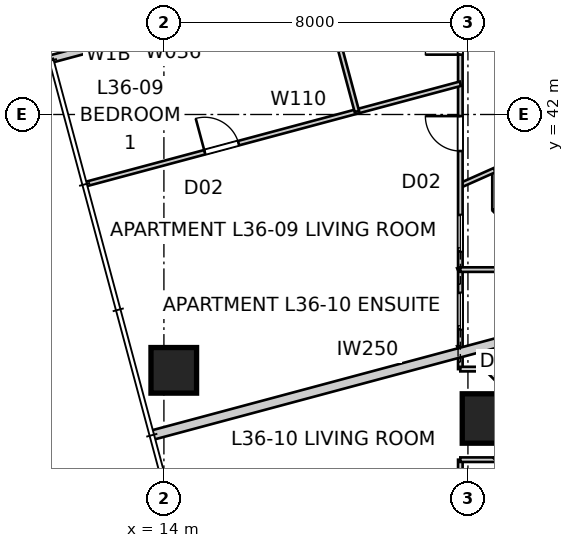
"""IFC4 building model, lengths in metres.
Left out: names, types, materials, properties, quantities, classifications, styles, units other than length and angle.
Written with IfcOpenShell. Run it as: python <this file> out.ifc"""

import sys

from ifc_helpers import new_model, si_unit, direction, frame, frame_2d, origin, origin_2d, place, context, subcontext, project, spatial, rectangle, extrude, element, fill, save


model = new_model("IFC4")
c1 = context("Model", 3, precision=1e-05, world=origin(), true_north=direction((0.0, 1.0)))
c2 = subcontext(c1, "Body", "Model", "MODEL_VIEW")
j1 = project(units=[si_unit("LENGTHUNIT", "METRE"), si_unit("PLANEANGLEUNIT", "RADIAN")], contexts=[c1])
p1 = place(None, origin())
s1 = spatial("IfcSite", under=j1, at=p1, CompositionType="ELEMENT")
p2 = place(p1, origin())
s2 = spatial("IfcBuilding", under=s1, at=p2, CompositionType="ELEMENT")
p3 = place(p2, frame((0.0, 0.0, 132.0)))
s3 = spatial("IfcBuildingStorey", under=s2, at=p3, CompositionType="ELEMENT", Elevation=132.0)
p4 = place(p3, frame((14.26, 35.267, 0.0), z_axis=(0.0, 0.0, 1.0), x_axis=(1.0, 0.0, 0.0)))
e1 = element("IfcColumn", 1, at=p4, inside=s3, PredefinedType="COLUMN", context=c2, shape_type="SweptSolid", body=[
    extrude(rectangle(XDim=1.2, YDim=1.2, at=origin_2d()), origin(), (0.0, 0.0, 1.0), 3.4),
])
p5 = place(p3, frame((22.5, 34.0, 0.0), z_axis=(0.0, 0.0, 1.0), x_axis=(1.0, 0.0, 0.0)))
e2 = element("IfcColumn", 2, at=p5, inside=s3, PredefinedType="COLUMN", context=c2, shape_type="SweptSolid", body=[
    extrude(rectangle(XDim=1.3, YDim=1.3, at=origin_2d()), origin(), (0.0, 0.0, 1.0), 3.4),
])
p6 = place(p3, frame((14.893, 44.496, 0.0), z_axis=(0.0, 0.0, 1.0), x_axis=(-0.965934430412, -0.258786931944, 0.0)))
e3 = element("IfcWall", 3, at=p6, inside=s3, PredefinedType="SOLIDWALL", context=c2, shape_type="SweptSolid", body=[
    extrude(rectangle(XDim=4.0, YDim=0.2, at=frame_2d((2.0, 0.0))), origin(), (0.0, 0.0, 1.0), 3.25),
])
p7 = place(p6, frame((1.0, 0.0, 0.45)))
e4 = element("IfcOpeningElement", 4, at=p7, cuts=e3, PredefinedType="OPENING", context=c2, shape_type="SweptSolid", body=[
    extrude(rectangle(XDim=2.0, YDim=1.8, at=frame_2d((1.0, 0.9))), frame((0.0, 0.11, 0.0), z_axis=(0.0, -1.0, 0.0), x_axis=(1.0, 0.0, 0.0)), (0.0, 0.0, 1.0), 0.22),
])
p8 = place(p3, frame((13.682, 33.56, 0.0), z_axis=(0.0, 0.0, 1.0), x_axis=(0.965924438766, 0.258824223352, 0.0)))
e5 = element("IfcWall", 5, at=p8, inside=s3, PredefinedType="PARTITIONING", context=c2, shape_type="SweptSolid", body=[
    extrude(rectangle(XDim=12.138, YDim=0.25, at=frame_2d((6.069, 0.0))), origin(), (0.0, 0.0, 1.0), 3.25),
])
p9 = place(p3, frame((21.8, 11.8, 0.0), z_axis=(0.0, 0.0, 1.0), x_axis=(0.0, 1.0, 0.0)))
e6 = element("IfcWall", 6, at=p9, inside=s3, PredefinedType="PARTITIONING", context=c2, shape_type="SweptSolid", body=[
    extrude(rectangle(XDim=21.116, YDim=0.12, at=frame_2d((10.558, 0.0))), origin(), (0.0, 0.0, 1.0), 3.25),
])
p10 = place(p9, frame((4.046, 0.0, 0.0)))
e7 = element("IfcOpeningElement", 7, at=p10, cuts=e6, PredefinedType="OPENING", context=c2, shape_type="SweptSolid", body=[
    extrude(rectangle(XDim=0.92, YDim=2.34, at=frame_2d((0.46, 1.17))), frame((0.0, 0.07, 0.0), z_axis=(0.0, -1.0, 0.0), x_axis=(1.0, 0.0, 0.0)), (0.0, 0.0, 1.0), 0.14),
])
p11 = place(p9, frame((7.358, 0.0, 0.0)))
e8 = element("IfcOpeningElement", 8, at=p11, cuts=e6, PredefinedType="OPENING", context=c2, shape_type="SweptSolid", body=[
    extrude(rectangle(XDim=0.92, YDim=2.34, at=frame_2d((0.46, 1.17))), frame((0.0, 0.07, 0.0), z_axis=(0.0, -1.0, 0.0), x_axis=(1.0, 0.0, 0.0)), (0.0, 0.0, 1.0), 0.14),
])
p12 = place(p9, frame((14.958, 0.0, 0.0)))
e9 = element("IfcOpeningElement", 9, at=p12, cuts=e6, PredefinedType="OPENING", context=c2, shape_type="SweptSolid", body=[
    extrude(rectangle(XDim=0.92, YDim=2.34, at=frame_2d((0.46, 1.17))), frame((0.0, 0.07, 0.0), z_axis=(0.0, -1.0, 0.0), x_axis=(1.0, 0.0, 0.0)), (0.0, 0.0, 1.0), 0.14),
])
p13 = place(p9, frame((17.31, 0.0, 0.0)))
e10 = element("IfcOpeningElement", 10, at=p13, cuts=e6, PredefinedType="OPENING", context=c2, shape_type="SweptSolid", body=[
    extrude(rectangle(XDim=0.92, YDim=2.34, at=frame_2d((0.46, 1.17))), frame((0.0, 0.07, 0.0), z_axis=(0.0, -1.0, 0.0), x_axis=(1.0, 0.0, 0.0)), (0.0, 0.0, 1.0), 0.14),
])
p14 = place(p3, frame((23.3, 38.9, 0.0), z_axis=(0.0, 0.0, 1.0), x_axis=(-0.707106781187, 0.707106781187, 0.0)))
e11 = element("IfcWall", 11, at=p14, inside=s3, PredefinedType="PARTITIONING", context=c2, shape_type="SweptSolid", body=[
    extrude(rectangle(XDim=0.849, YDim=0.12, at=frame_2d((0.424, 0.0))), origin(), (0.0, 0.0, 1.0), 3.25),
])
p15 = place(p3, frame((22.7, 39.5, 0.0), z_axis=(0.0, 0.0, 1.0), x_axis=(0.0, 1.0, 0.0)))
e12 = element("IfcWall", 12, at=p15, inside=s3, PredefinedType="PARTITIONING", context=c2, shape_type="SweptSolid", body=[
    extrude(rectangle(XDim=1.035, YDim=0.12, at=frame_2d((0.518, 0.0))), origin(), (0.0, 0.0, 1.0), 3.25),
])
p16 = place(p3, frame((22.7, 40.535, 0.0), z_axis=(0.0, 0.0, 1.0), x_axis=(-0.913739977195, -0.406299463544, 0.0)))
e13 = element("IfcWall", 13, at=p16, inside=s3, PredefinedType="PARTITIONING", context=c2, shape_type="SweptSolid", body=[
    extrude(rectangle(XDim=0.985, YDim=0.12, at=frame_2d((0.492, 0.0))), origin(), (0.0, 0.0, 1.0), 3.25),
])
p17 = place(p3, frame((21.8, 35.3, 0.0), z_axis=(0.0, 0.0, 1.0), x_axis=(0.0, 1.0, 0.0)))
e14 = element("IfcWall", 14, at=p17, inside=s3, PredefinedType="PARTITIONING", context=c2, shape_type="SweptSolid", body=[
    extrude(rectangle(XDim=12.45, YDim=0.12, at=frame_2d((6.225, 0.0))), origin(), (0.0, 0.0, 1.0), 2.637),
])
p18 = place(p17, frame((5.738, 0.0, 0.0)))
e15 = element("IfcOpeningElement", 15, at=p18, cuts=e14, PredefinedType="OPENING", context=c2, shape_type="SweptSolid", body=[
    extrude(rectangle(XDim=0.92, YDim=2.34, at=frame_2d((0.46, 1.17))), frame((0.0, 0.07, 0.0), z_axis=(0.0, -1.0, 0.0), x_axis=(1.0, 0.0, 0.0)), (0.0, 0.0, 1.0), 0.14),
])
p19 = place(p17, frame((8.275, 0.0, 0.0)))
e16 = element("IfcOpeningElement", 16, at=p19, cuts=e14, PredefinedType="OPENING", context=c2, shape_type="SweptSolid", body=[
    extrude(rectangle(XDim=0.92, YDim=2.34, at=frame_2d((0.46, 1.17))), frame((0.0, 0.07, 0.0), z_axis=(0.0, -1.0, 0.0), x_axis=(1.0, 0.0, 0.0)), (0.0, 0.0, 1.0), 0.14),
])
p20 = place(p17, frame((3.097, 0.0, 0.0)))
e17 = element("IfcOpeningElement", 17, at=p20, cuts=e14, PredefinedType="OPENING", context=c2, shape_type="SweptSolid", body=[
    extrude(rectangle(XDim=0.96, YDim=2.1, at=frame_2d((0.48, 1.05))), frame((0.0, 0.07, 0.0), z_axis=(0.0, -1.0, 0.0), x_axis=(1.0, 0.0, 0.0)), (0.0, 0.0, 1.0), 0.14),
])
p21 = place(p17, frame((1.047, 0.0, 0.0)))
e18 = element("IfcOpeningElement", 18, at=p21, cuts=e14, PredefinedType="OPENING", context=c2, shape_type="SweptSolid", body=[
    extrude(rectangle(XDim=0.96, YDim=2.1, at=frame_2d((0.48, 1.05))), frame((0.0, 0.07, 0.0), z_axis=(0.0, -1.0, 0.0), x_axis=(1.0, 0.0, 0.0)), (0.0, 0.0, 1.0), 0.14),
])
p22 = place(p3, frame((25.4, 37.918, 0.0), z_axis=(0.0, 0.0, 1.0), x_axis=(-1.0, 0.0, 0.0)))
e19 = element("IfcWall", 19, at=p22, inside=s3, PredefinedType="PARTITIONING", context=c2, shape_type="SweptSolid", body=[
    extrude(rectangle(XDim=3.6, YDim=0.12, at=frame_2d((1.8, 0.0))), origin(), (0.0, 0.0, 1.0), 3.25),
])
p23 = place(p3, frame((11.952, 40.17, 0.0), z_axis=(0.0, 0.0, 1.0), x_axis=(0.965923039694, 0.258829444594, 0.0)))
e20 = element("IfcWall", 20, at=p23, inside=s3, PredefinedType="PARTITIONING", context=c2, shape_type="SweptSolid", body=[
    extrude(rectangle(XDim=10.196, YDim=0.12, at=frame_2d((5.098, 0.0))), origin(), (0.0, 0.0, 1.0), 3.25),
])
p24 = place(p23, frame((3.233, 0.0, 0.0)))
e21 = element("IfcOpeningElement", 21, at=p24, cuts=e20, PredefinedType="OPENING", context=c2, shape_type="SweptSolid", body=[
    extrude(rectangle(XDim=0.92, YDim=2.34, at=frame_2d((0.46, 1.17))), frame((0.0, 0.07, 0.0), z_axis=(0.0, -1.0, 0.0), x_axis=(1.0, 0.0, 0.0)), (0.0, 0.0, 1.0), 0.14),
])
p25 = place(p3, frame((17.168, 49.205, 0.0), z_axis=(0.0, 0.0, 1.0), x_axis=(0.258846923464, -0.965918355874, 0.0)))
e22 = element("IfcWall", 22, at=p25, inside=s3, PredefinedType="PARTITIONING", context=c2, shape_type="SweptSolid", body=[
    extrude(rectangle(XDim=7.377, YDim=0.12, at=frame_2d((3.688, 0.0))), origin(), (0.0, 0.0, 1.0), 3.25),
])
p26 = place(p25, frame((1.525, 0.0, 0.0)))
e23 = element("IfcOpeningElement", 23, at=p26, cuts=e22, PredefinedType="OPENING", context=c2, shape_type="SweptSolid", body=[
    extrude(rectangle(XDim=0.92, YDim=2.34, at=frame_2d((0.46, 1.17))), frame((0.0, 0.07, 0.0), z_axis=(0.0, -1.0, 0.0), x_axis=(1.0, 0.0, 0.0)), (0.0, 0.0, 1.0), 0.14),
])
p27 = place(p3, frame((25.4, 32.916, 0.0), z_axis=(0.0, 0.0, 1.0), x_axis=(-1.0, 0.0, 0.0)))
e24 = element("IfcWall", 24, at=p27, inside=s3, PredefinedType="PARTITIONING", context=c2, shape_type="SweptSolid", body=[
    extrude(rectangle(XDim=3.6, YDim=0.12, at=frame_2d((1.8, 0.0))), origin(), (0.0, 0.0, 1.0), 2.796),
])
p28 = place(p27, frame((0.862, 0.0, 0.0)))
e25 = element("IfcOpeningElement", 25, at=p28, cuts=e24, PredefinedType="OPENING", context=c2, shape_type="SweptSolid", body=[
    extrude(rectangle(XDim=0.96, YDim=2.1, at=frame_2d((0.48, 1.05))), frame((0.0, 0.07, 0.0), z_axis=(0.0, -1.0, 0.0), x_axis=(1.0, 0.0, 0.0)), (0.0, 0.0, 1.0), 0.14),
])
p29 = place(p3, frame((22.716, 32.916, 0.0), z_axis=(0.0, 0.0, 1.0), x_axis=(0.707106781187, 0.707106781187, 0.0)))
e26 = element("IfcWall", 26, at=p29, inside=s3, PredefinedType="PARTITIONING", context=c2, shape_type="SweptSolid", body=[
    extrude(rectangle(XDim=0.543, YDim=0.12, at=frame_2d((0.271, 0.0))), origin(), (0.0, 0.0, 1.0), 3.25),
])
p30 = place(p3, frame((23.1, 34.7, 0.0), z_axis=(0.0, 0.0, 1.0), x_axis=(-0.707106781187, 0.707106781187, 0.0)))
e27 = element("IfcWall", 27, at=p30, inside=s3, PredefinedType="PARTITIONING", context=c2, shape_type="SweptSolid", body=[
    extrude(rectangle(XDim=0.849, YDim=0.12, at=frame_2d((0.424, 0.0))), origin(), (0.0, 0.0, 1.0), 3.25),
])
p31 = place(p3, frame((22.5, 35.3, 0.0), z_axis=(0.0, 0.0, 1.0), x_axis=(-1.0, 0.0, 0.0)))
e28 = element("IfcWall", 28, at=p31, inside=s3, PredefinedType="PARTITIONING", context=c2, shape_type="SweptSolid", body=[
    extrude(rectangle(XDim=0.7, YDim=0.12, at=frame_2d((0.35, 0.0))), origin(), (0.0, 0.0, 1.0), 2.721),
])
p32 = place(p18, origin())
e29 = element("IfcDoor", 29, at=p32, inside=s3, OperationType="SINGLE_SWING_RIGHT", PredefinedType="DOOR", context=c2, shape_type="SweptSolid", body=[
    extrude(rectangle(XDim=0.92, YDim=2.34, at=frame_2d((0.46, 1.17))), frame((0.0, 0.025, 0.0), z_axis=(0.0, -1.0, 0.0), x_axis=(1.0, 0.0, 0.0)), (0.0, 0.0, 1.0), 0.05),
])
fill(e15, e29)
p33 = place(p19, origin())
e30 = element("IfcDoor", 30, at=p33, inside=s3, OperationType="SINGLE_SWING_LEFT", PredefinedType="DOOR", context=c2, shape_type="SweptSolid", body=[
    extrude(rectangle(XDim=0.92, YDim=2.34, at=frame_2d((0.46, 1.17))), frame((0.0, 0.025, 0.0), z_axis=(0.0, -1.0, 0.0), x_axis=(1.0, 0.0, 0.0)), (0.0, 0.0, 1.0), 0.05),
])
fill(e16, e30)
p34 = place(p24, origin())
e31 = element("IfcDoor", 31, at=p34, inside=s3, OperationType="SINGLE_SWING_LEFT", PredefinedType="DOOR", context=c2, shape_type="SweptSolid", body=[
    extrude(rectangle(XDim=0.92, YDim=2.34, at=frame_2d((0.46, 1.17))), frame((0.0, 0.025, 0.0), z_axis=(0.0, -1.0, 0.0), x_axis=(1.0, 0.0, 0.0)), (0.0, 0.0, 1.0), 0.05),
])
fill(e21, e31)
p35 = place(p20, origin())
e32 = element("IfcDoor", 32, at=p35, inside=s3, OperationType="SLIDING_TO_LEFT", PredefinedType="DOOR", context=c2, shape_type="SweptSolid", body=[
    extrude(rectangle(XDim=0.96, YDim=2.1, at=frame_2d((0.48, 1.05))), frame((0.0, 0.025, 0.0), z_axis=(0.0, -1.0, 0.0), x_axis=(1.0, 0.0, 0.0)), (0.0, 0.0, 1.0), 0.05),
])
fill(e17, e32)
p36 = place(p21, origin())
e33 = element("IfcDoor", 33, at=p36, inside=s3, OperationType="SLIDING_TO_LEFT", PredefinedType="DOOR", context=c2, shape_type="SweptSolid", body=[
    extrude(rectangle(XDim=0.96, YDim=2.1, at=frame_2d((0.48, 1.05))), frame((0.0, 0.025, 0.0), z_axis=(0.0, -1.0, 0.0), x_axis=(1.0, 0.0, 0.0)), (0.0, 0.0, 1.0), 0.05),
])
fill(e18, e33)
save(model, sys.argv[1])
